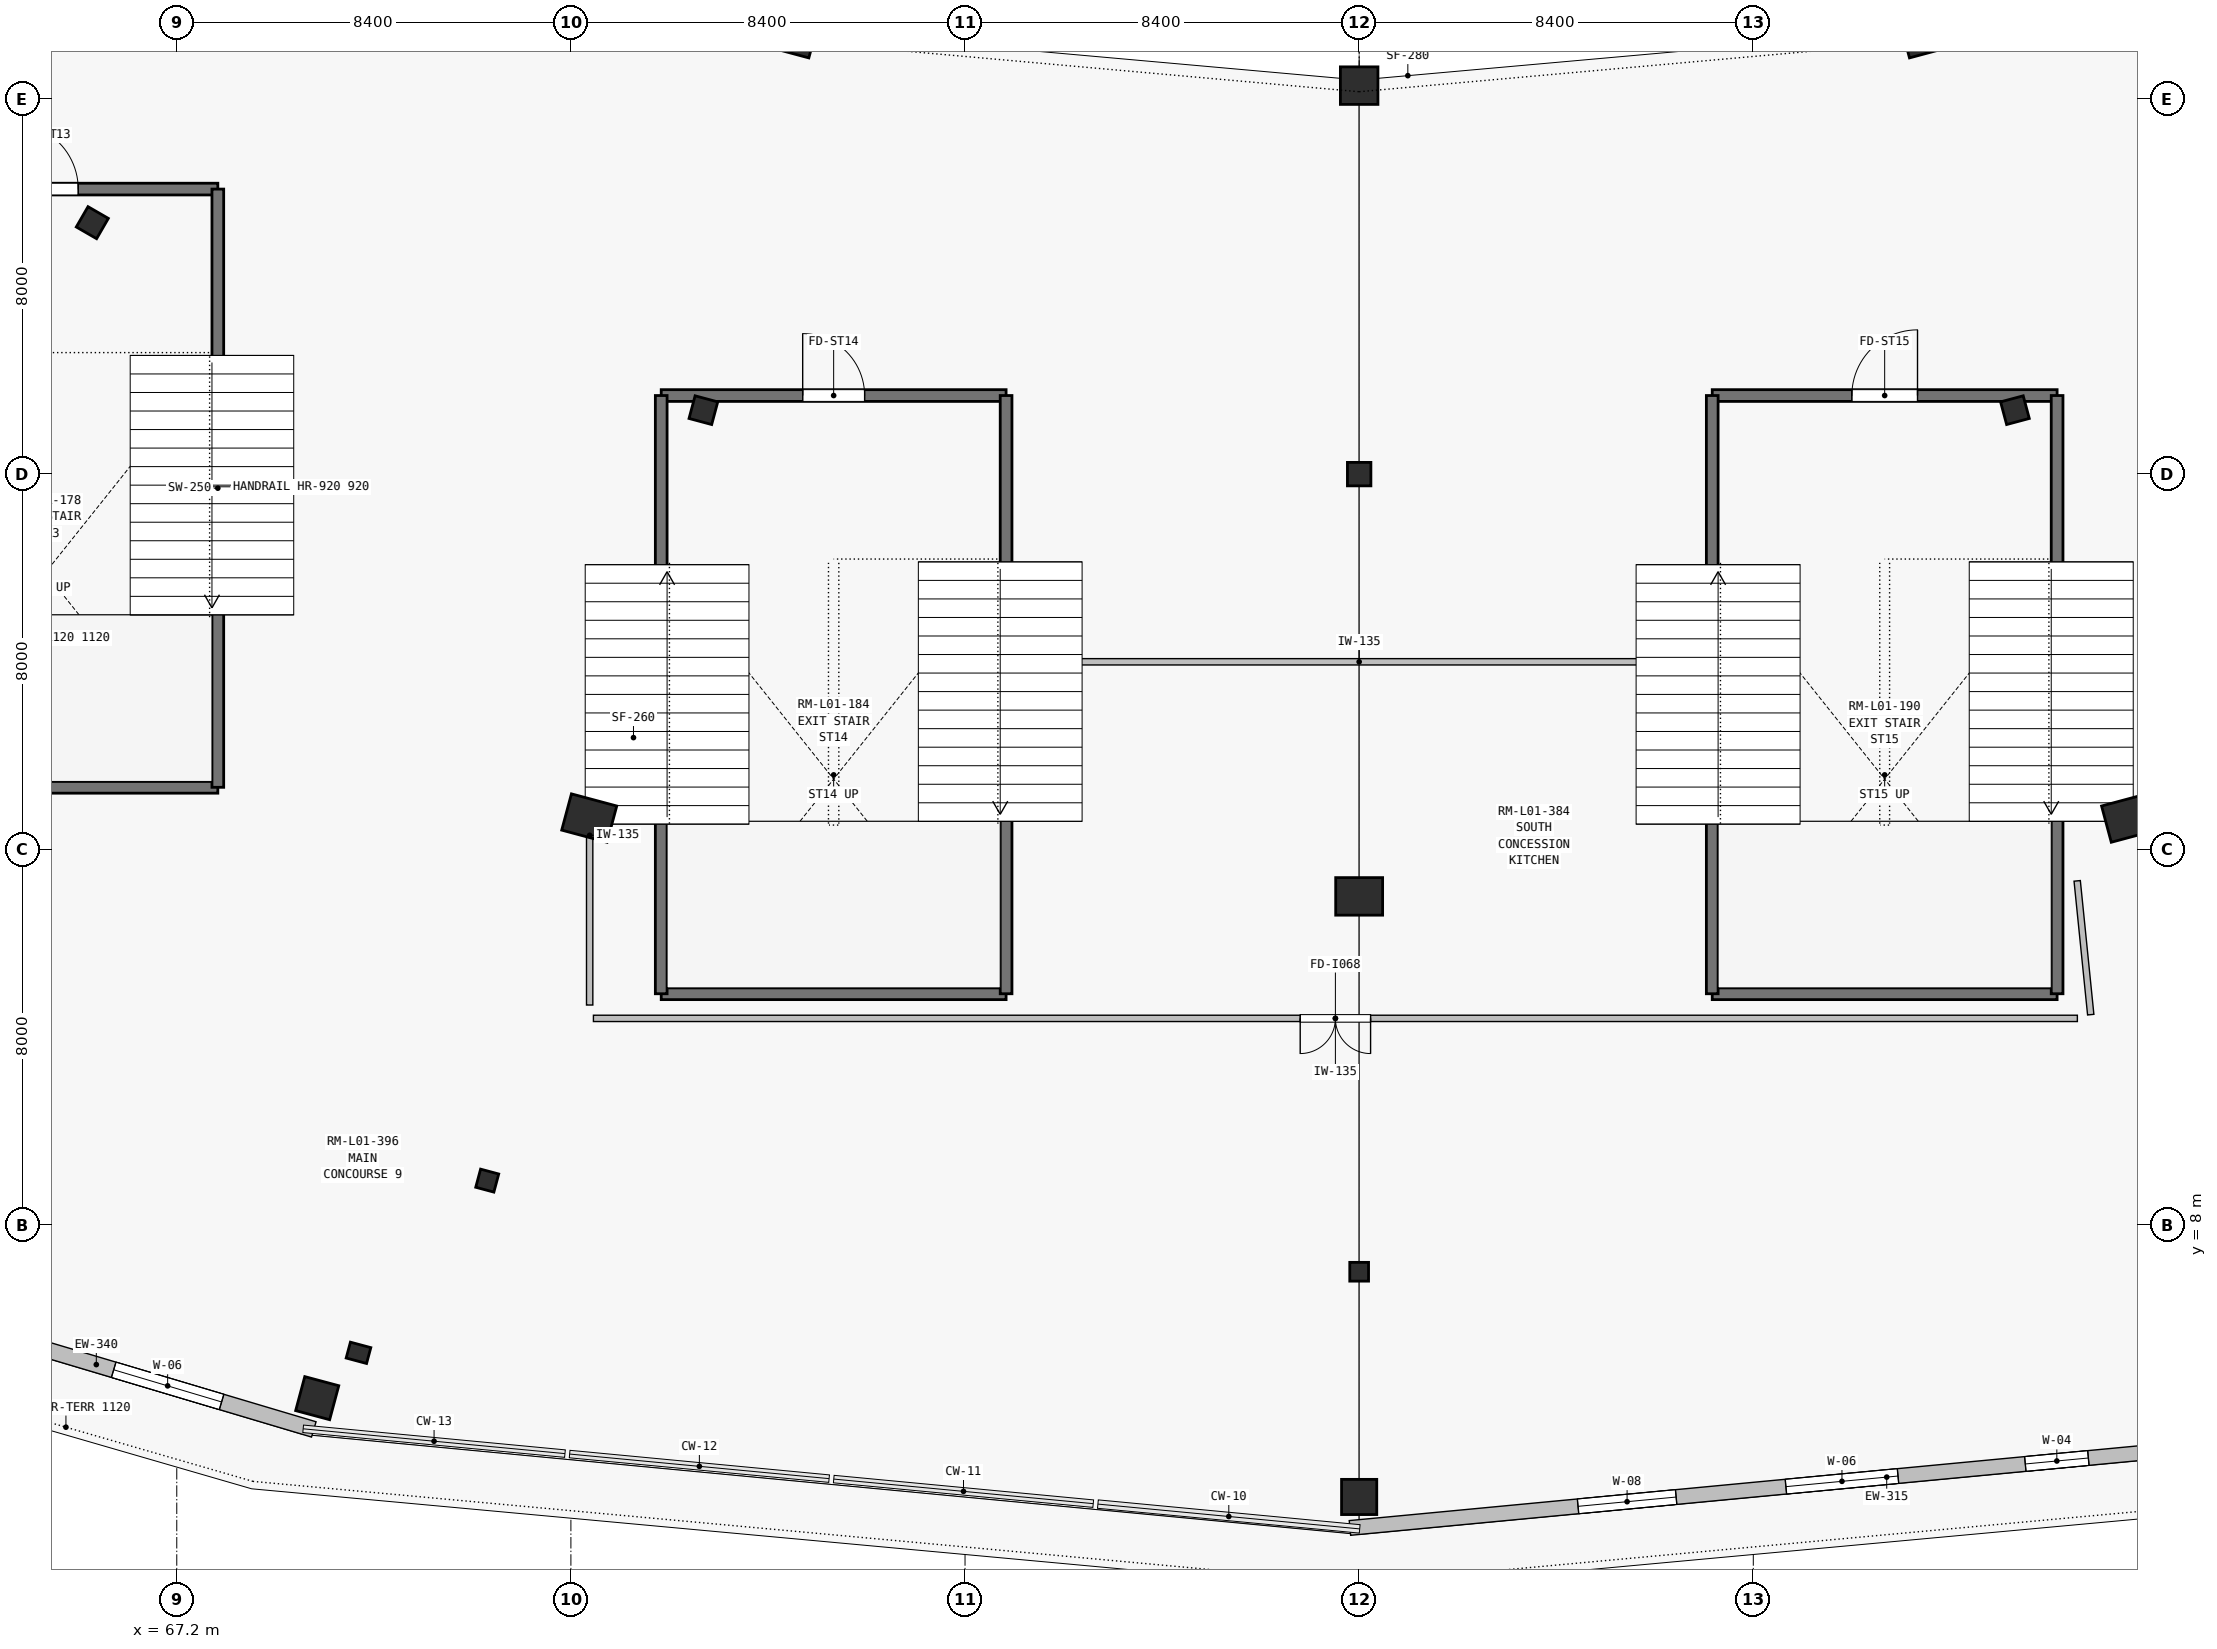
"""IFC4 building model, lengths in metres.
Left out: names, types, materials, properties, quantities, classifications, styles, units other than length and angle.
Written with IfcOpenShell. Run it as: python <this file> out.ifc"""

import sys

from ifc_helpers import new_model, si_unit, direction, frame, frame_2d, origin, origin_2d, place, context, subcontext, project, spatial, rectangle, i_section, extrude, element, fill, save


model = new_model("IFC4")
c1 = context("Model", 3, precision=1e-05, world=origin(), true_north=direction((0.0, 1.0)))
c2 = subcontext(c1, "Body", "Model", "MODEL_VIEW")
j1 = project(units=[si_unit("LENGTHUNIT", "METRE"), si_unit("PLANEANGLEUNIT", "RADIAN")], contexts=[c1])
p1 = place(None, origin())
s1 = spatial("IfcSite", under=j1, at=p1, CompositionType="ELEMENT")
p2 = place(p1, origin())
s2 = spatial("IfcBuilding", under=s1, at=p2, CompositionType="ELEMENT")
p3 = place(p2, frame((0.0, 0.0, 5.4)))
s3 = spatial("IfcBuildingStorey", under=s2, at=p3, CompositionType="ELEMENT", Elevation=5.4)
for number, where, z_axis, x_axis in (
    (1, (65.4, 29.359, 0.0), (0.0, 0.0, 1.0), (-0.5, -0.866, 0.0)),
    (2, (78.424, 25.363, 0.0), (0.0, 0.0, 1.0), (-0.259, -0.966, 0.0)),
    (3, (92.4, 24.0, 0.0), (0.0, 0.0, 1.0), (0.0, -1.0, 0.0)),
    (4, (106.376, 25.363, 0.0), (0.0, 0.0, 1.0), (0.259, -0.966, 0.0)),
):
    element("IfcColumn", number, at=place(p3, frame(where, z_axis=z_axis, x_axis=x_axis)), inside=s3, PredefinedType="COLUMN", context=c2, shape_type="SweptSolid", body=[
        extrude(i_section(OverallWidth=0.5, OverallDepth=0.5, WebThickness=0.02, FlangeThickness=0.035, at=origin_2d()), origin(), (0.0, 0.0, 1.0), 4.5),
    ])
for number, where, z_axis, x_axis in (
    (5, (80.388, 33.361, 0.0), (0.0, 0.0, 1.0), (-0.259, -0.966, 0.0)),
    (6, (92.4, 32.28, 0.0), (0.0, 0.0, 1.0), (0.0, -1.0, 0.0)),
    (7, (104.412, 33.361, 0.0), (0.0, 0.0, 1.0), (0.259, -0.966, 0.0)),
):
    element("IfcColumn", number, at=place(p3, frame(where, z_axis=z_axis, x_axis=x_axis)), inside=s3, PredefinedType="COLUMN", context=c2, shape_type="SweptSolid", body=[
        extrude(rectangle(XDim=0.8, YDim=0.8, at=origin_2d()), origin(), (0.0, 0.0, 1.0), 4.5),
    ])
for number, where, z_axis, x_axis in (
    (8, (75.991, 16.67, 0.0), (0.0, 0.0, 1.0), (-0.259, -0.966, 0.0)),
    (9, (92.4, 15.0, 0.0), (0.0, 0.0, 1.0), (0.0, -1.0, 0.0)),
    (10, (108.809, 16.67, 0.0), (0.0, 0.0, 1.0), (0.259, -0.966, 0.0)),
):
    element("IfcColumn", number, at=place(p3, frame(where, z_axis=z_axis, x_axis=x_axis)), inside=s3, PredefinedType="COLUMN", context=c2, shape_type="SweptSolid", body=[
        extrude(rectangle(XDim=0.8, YDim=1.0, at=origin_2d()), origin(), (0.0, 0.0, 1.0), 4.5),
    ])
for number, where, z_axis, x_axis in (
    (11, (73.817, 8.942, 0.0), (0.0, 0.0, 1.0), (-0.259, -0.966, 0.0)),
    (12, (92.4, 7.0, 0.0), (0.0, 0.0, 1.0), (0.0, -1.0, 0.0)),
):
    element("IfcColumn", number, at=place(p3, frame(where, z_axis=z_axis, x_axis=x_axis)), inside=s3, PredefinedType="COLUMN", context=c2, shape_type="SweptSolid", body=[
        extrude(i_section(OverallWidth=0.4, OverallDepth=0.4, WebThickness=0.018, FlangeThickness=0.032, at=origin_2d()), origin(), (0.0, 0.0, 1.0), 4.5),
    ])
for number, where, z_axis, x_axis in (
    (13, (70.193, 4.306, 0.0), (0.0, 0.0, 1.0), (-0.259, -0.966, 0.0)),
    (14, (92.4, 2.2, 0.0), (0.0, 0.0, 1.0), (0.0, -1.0, 0.0)),
):
    element("IfcColumn", number, at=place(p3, frame(where, z_axis=z_axis, x_axis=x_axis)), inside=s3, PredefinedType="COLUMN", context=c2, shape_type="SweptSolid", body=[
        extrude(rectangle(XDim=0.75, YDim=0.75, at=origin_2d()), origin(), (0.0, 0.0, 1.0), 4.25),
    ])
p4 = place(p3, frame((71.073, 5.272, 0.0), z_axis=(0.0, 0.0, 1.0), x_axis=(-0.258819045103, -0.965925826289, 0.0)))
e15 = element("IfcColumn", 15, at=p4, inside=s3, PredefinedType="PILASTER", context=c2, shape_type="SweptSolid", body=[
    extrude(rectangle(XDim=0.35, YDim=0.45, at=origin_2d()), origin(), (0.0, 0.0, 1.0), 4.5),
])
p5 = place(p3, frame((115.084, 3.707, 0.0), z_axis=(0.0, 0.0, 1.0), x_axis=(-0.995543183051, -0.094306790217, 0.0)))
e16 = element("IfcWall", 16, at=p5, inside=s3, PredefinedType="SOLIDWALL", context=c2, shape_type="SweptSolid", body=[
    extrude(rectangle(XDim=22.983, YDim=0.315, at=frame_2d((11.492, 0.0))), origin(), (0.0, 0.0, 1.0), 4.25),
])
p6 = place(p5, frame((1.683, 0.0, 0.0)))
e17 = element("IfcOpeningElement", 17, at=p6, cuts=e16, PredefinedType="OPENING", context=c2, shape_type="SweptSolid", body=[
    extrude(rectangle(XDim=1.95, YDim=2.35, at=frame_2d((0.975, 1.175))), frame((0.0, 0.167, 0.0), z_axis=(0.0, -1.0, 0.0), x_axis=(1.0, 0.0, 0.0)), (0.0, 0.0, 1.0), 0.335),
])
p7 = place(p5, frame((7.175, 0.0, 0.75)))
e18 = element("IfcOpeningElement", 18, at=p7, cuts=e16, PredefinedType="OPENING", context=c2, shape_type="SweptSolid", body=[
    extrude(rectangle(XDim=1.35, YDim=2.3, at=frame_2d((0.675, 1.15))), frame((0.0, 0.167, 0.0), z_axis=(0.0, -1.0, 0.0), x_axis=(1.0, 0.0, 0.0)), (0.0, 0.0, 1.0), 0.335),
])
p8 = place(p5, frame((11.25, 0.0, 0.9)))
e19 = element("IfcOpeningElement", 19, at=p8, cuts=e16, PredefinedType="OPENING", context=c2, shape_type="SweptSolid", body=[
    extrude(rectangle(XDim=2.4, YDim=2.1, at=frame_2d((1.2, 1.05))), frame((0.0, 0.167, 0.0), z_axis=(0.0, -1.0, 0.0), x_axis=(1.0, 0.0, 0.0)), (0.0, 0.0, 1.0), 0.335),
])
p9 = place(p5, frame((16.0, 0.0, 0.9)))
e20 = element("IfcOpeningElement", 20, at=p9, cuts=e16, PredefinedType="OPENING", context=c2, shape_type="SweptSolid", body=[
    extrude(rectangle(XDim=2.1, YDim=2.0, at=frame_2d((1.05, 1.0))), frame((0.0, 0.167, 0.0), z_axis=(0.0, -1.0, 0.0), x_axis=(1.0, 0.0, 0.0)), (0.0, 0.0, 1.0), 0.335),
])
p10 = place(p3, frame((70.12, 3.64, 0.0), z_axis=(0.0, 0.0, 1.0), x_axis=(-0.958339954226, 0.285630061678, 0.0)))
e21 = element("IfcWall", 21, at=p10, inside=s3, PredefinedType="SOLIDWALL", context=c2, shape_type="SweptSolid", body=[
    extrude(rectangle(XDim=22.289, YDim=0.34, at=frame_2d((11.145, 0.0))), origin(), (0.0, 0.0, 1.0), 4.25),
])
p11 = place(p10, frame((2.05, 0.0, 0.9)))
e22 = element("IfcOpeningElement", 22, at=p11, cuts=e21, PredefinedType="OPENING", context=c2, shape_type="SweptSolid", body=[
    extrude(rectangle(XDim=2.4, YDim=2.1, at=frame_2d((1.2, 1.05))), frame((0.0, 0.18, 0.0), z_axis=(0.0, -1.0, 0.0), x_axis=(1.0, 0.0, 0.0)), (0.0, 0.0, 1.0), 0.36),
])
p12 = place(p10, frame((6.8, 0.0, 0.9)))
e23 = element("IfcOpeningElement", 23, at=p12, cuts=e21, PredefinedType="OPENING", context=c2, shape_type="SweptSolid", body=[
    extrude(rectangle(XDim=2.1, YDim=2.0, at=frame_2d((1.05, 1.0))), frame((0.0, 0.18, 0.0), z_axis=(0.0, -1.0, 0.0), x_axis=(1.0, 0.0, 0.0)), (0.0, 0.0, 1.0), 0.36),
])
p13 = place(p10, frame((10.95, 0.0, 0.9)))
e24 = element("IfcOpeningElement", 24, at=p13, cuts=e21, PredefinedType="OPENING", context=c2, shape_type="SweptSolid", body=[
    extrude(rectangle(XDim=3.0, YDim=1.6, at=frame_2d((1.5, 0.8))), frame((0.0, 0.18, 0.0), z_axis=(0.0, -1.0, 0.0), x_axis=(1.0, 0.0, 0.0)), (0.0, 0.0, 1.0), 0.36),
])
p14 = place(p10, frame((15.7, 0.0, 0.9)))
e25 = element("IfcOpeningElement", 25, at=p14, cuts=e21, PredefinedType="OPENING", context=c2, shape_type="SweptSolid", body=[
    extrude(rectangle(XDim=2.7, YDim=1.55, at=frame_2d((1.35, 0.775))), frame((0.0, 0.18, 0.0), z_axis=(0.0, -1.0, 0.0), x_axis=(1.0, 0.0, 0.0)), (0.0, 0.0, 1.0), 0.36),
])
p15 = place(p3, frame((60.725, 17.325, 0.0), z_axis=(0.0, 0.0, 1.0), x_axis=(1.0, 0.0, 0.0)))
e26 = element("IfcWall", 26, at=p15, inside=s3, PredefinedType="SHEAR", context=c2, shape_type="SweptSolid", body=[
    extrude(rectangle(XDim=7.35, YDim=0.25, at=frame_2d((3.675, 0.0))), origin(), (0.0, 0.0, 1.0), 4.5),
])
p16 = place(p3, frame((60.725, 30.075, 0.0), z_axis=(0.0, 0.0, 1.0), x_axis=(1.0, 0.0, 0.0)))
e27 = element("IfcWall", 27, at=p16, inside=s3, PredefinedType="SHEAR", context=c2, shape_type="SweptSolid", body=[
    extrude(rectangle(XDim=7.35, YDim=0.25, at=frame_2d((3.675, 0.0))), origin(), (0.0, 0.0, 1.0), 4.5),
])
p17 = place(p16, frame((2.975, 0.0, 0.0)))
e28 = element("IfcOpeningElement", 28, at=p17, cuts=e27, PredefinedType="OPENING", context=c2, shape_type="SweptSolid", body=[
    extrude(rectangle(XDim=1.4, YDim=2.2, at=frame_2d((0.7, 1.1))), frame((0.0, 0.135, 0.0), z_axis=(0.0, -1.0, 0.0), x_axis=(1.0, 0.0, 0.0)), (0.0, 0.0, 1.0), 0.27),
])
p18 = place(p3, frame((68.075, 17.325, 0.0), z_axis=(0.0, 0.0, 1.0), x_axis=(0.0, 1.0, 0.0)))
e29 = element("IfcWall", 29, at=p18, inside=s3, PredefinedType="SHEAR", context=c2, shape_type="SweptSolid", body=[
    extrude(rectangle(XDim=12.75, YDim=0.25, at=frame_2d((6.375, 0.0))), origin(), (0.0, 0.0, 1.0), 4.5),
])
p19 = place(p3, frame((77.525, 12.925, 0.0), z_axis=(0.0, 0.0, 1.0), x_axis=(1.0, 0.0, 0.0)))
e30 = element("IfcWall", 30, at=p19, inside=s3, PredefinedType="SHEAR", context=c2, shape_type="SweptSolid", body=[
    extrude(rectangle(XDim=7.35, YDim=0.25, at=frame_2d((3.675, 0.0))), origin(), (0.0, 0.0, 1.0), 4.5),
])
p20 = place(p3, frame((77.525, 25.675, 0.0), z_axis=(0.0, 0.0, 1.0), x_axis=(1.0, 0.0, 0.0)))
e31 = element("IfcWall", 31, at=p20, inside=s3, PredefinedType="SHEAR", context=c2, shape_type="SweptSolid", body=[
    extrude(rectangle(XDim=7.35, YDim=0.25, at=frame_2d((3.675, 0.0))), origin(), (0.0, 0.0, 1.0), 4.5),
])
p21 = place(p20, frame((3.015, 0.0, 0.0)))
e32 = element("IfcOpeningElement", 32, at=p21, cuts=e31, PredefinedType="OPENING", context=c2, shape_type="SweptSolid", body=[
    extrude(rectangle(XDim=1.32, YDim=2.2, at=frame_2d((0.66, 1.1))), frame((0.0, 0.135, 0.0), z_axis=(0.0, -1.0, 0.0), x_axis=(1.0, 0.0, 0.0)), (0.0, 0.0, 1.0), 0.27),
])
for number, where, z_axis, x_axis in (
    (33, (77.525, 12.925, 0.0), (0.0, 0.0, 1.0), (0.0, 1.0, 0.0)),
    (34, (84.875, 12.925, 0.0), (0.0, 0.0, 1.0), (0.0, 1.0, 0.0)),
):
    element("IfcWall", number, at=place(p3, frame(where, z_axis=z_axis, x_axis=x_axis)), inside=s3, PredefinedType="SHEAR", context=c2, shape_type="SweptSolid", body=[
        extrude(rectangle(XDim=12.75, YDim=0.25, at=frame_2d((6.375, 0.0))), origin(), (0.0, 0.0, 1.0), 4.5),
    ])
p22 = place(p3, frame((99.925, 12.925, 0.0), z_axis=(0.0, 0.0, 1.0), x_axis=(1.0, 0.0, 0.0)))
e35 = element("IfcWall", 35, at=p22, inside=s3, PredefinedType="SHEAR", context=c2, shape_type="SweptSolid", body=[
    extrude(rectangle(XDim=7.35, YDim=0.25, at=frame_2d((3.675, 0.0))), origin(), (0.0, 0.0, 1.0), 4.5),
])
p23 = place(p3, frame((99.925, 25.675, 0.0), z_axis=(0.0, 0.0, 1.0), x_axis=(1.0, 0.0, 0.0)))
e36 = element("IfcWall", 36, at=p23, inside=s3, PredefinedType="SHEAR", context=c2, shape_type="SweptSolid", body=[
    extrude(rectangle(XDim=7.35, YDim=0.25, at=frame_2d((3.675, 0.0))), origin(), (0.0, 0.0, 1.0), 4.5),
])
p24 = place(p23, frame((2.975, 0.0, 0.0)))
e37 = element("IfcOpeningElement", 37, at=p24, cuts=e36, PredefinedType="OPENING", context=c2, shape_type="SweptSolid", body=[
    extrude(rectangle(XDim=1.4, YDim=2.2, at=frame_2d((0.7, 1.1))), frame((0.0, 0.135, 0.0), z_axis=(0.0, -1.0, 0.0), x_axis=(1.0, 0.0, 0.0)), (0.0, 0.0, 1.0), 0.27),
])
for number, where, z_axis, x_axis in (
    (38, (99.925, 12.925, 0.0), (0.0, 0.0, 1.0), (0.0, 1.0, 0.0)),
    (39, (107.275, 12.925, 0.0), (0.0, 0.0, 1.0), (0.0, 1.0, 0.0)),
):
    element("IfcWall", number, at=place(p3, frame(where, z_axis=z_axis, x_axis=x_axis)), inside=s3, PredefinedType="SHEAR", context=c2, shape_type="SweptSolid", body=[
        extrude(rectangle(XDim=12.75, YDim=0.25, at=frame_2d((6.375, 0.0))), origin(), (0.0, 0.0, 1.0), 4.5),
    ])
p25 = place(p3, frame((85.375, 20.0, 0.0), z_axis=(0.0, 0.0, 1.0), x_axis=(1.0, 0.0, 0.0)))
e40 = element("IfcWall", 40, at=p25, inside=s3, PredefinedType="PARTITIONING", context=c2, shape_type="SweptSolid", body=[
    extrude(rectangle(XDim=14.05, YDim=0.135, at=frame_2d((7.025, 0.0))), origin(), (0.0, 0.0, 1.0), 3.642),
])
p26 = place(p3, frame((107.703, 15.331, 0.0), z_axis=(0.0, 0.0, 1.0), x_axis=(0.10077723819, -0.994909015068, 0.0)))
e41 = element("IfcWall", 41, at=p26, inside=s3, PredefinedType="PARTITIONING", context=c2, shape_type="SweptSolid", body=[
    extrude(rectangle(XDim=2.866, YDim=0.135, at=frame_2d((1.433, 0.0))), origin(), (0.0, 0.0, 1.0), 3.823),
])
p27 = place(p3, frame((107.707, 12.4, 0.0), z_axis=(0.0, 0.0, 1.0), x_axis=(-1.0, 0.0, 0.0)))
e42 = element("IfcWall", 42, at=p27, inside=s3, PredefinedType="PARTITIONING", context=c2, shape_type="SweptSolid", body=[
    extrude(rectangle(XDim=31.627, YDim=0.135, at=frame_2d((15.813, 0.0))), origin(), (0.0, 0.0, 1.0), 3.642),
])
p28 = place(p27, frame((15.063, 0.0, 0.0)))
e43 = element("IfcOpeningElement", 43, at=p28, cuts=e42, PredefinedType="OPENING", context=c2, shape_type="SweptSolid", body=[
    extrude(rectangle(XDim=1.5, YDim=2.2, at=frame_2d((0.75, 1.1))), frame((0.0, 0.077, 0.0), z_axis=(0.0, -1.0, 0.0), x_axis=(1.0, 0.0, 0.0)), (0.0, 0.0, 1.0), 0.155),
])
p29 = place(p3, frame((76.0, 12.685, 0.0), z_axis=(0.0, 0.0, 1.0), x_axis=(0.0, 1.0, 0.0)))
e44 = element("IfcWall", 44, at=p29, inside=s3, PredefinedType="PARTITIONING", context=c2, shape_type="SweptSolid", body=[
    extrude(rectangle(XDim=7.235, YDim=0.135, at=frame_2d((3.618, 0.0))), origin(), (0.0, 0.0, 1.0), 3.682),
])
p30 = place(p7, origin())
e45 = element("IfcWindow", 45, at=p30, inside=s3, PartitioningType="SINGLE_PANEL", PredefinedType="WINDOW", context=c2, shape_type="SweptSolid", body=[
    extrude(rectangle(XDim=1.35, YDim=2.3, at=frame_2d((0.675, 1.15))), frame((0.0, 0.03, 0.0), z_axis=(0.0, -1.0, 0.0), x_axis=(1.0, 0.0, 0.0)), (0.0, 0.0, 1.0), 0.06),
])
fill(e18, e45)
p31 = place(p8, origin())
e46 = element("IfcWindow", 46, at=p31, inside=s3, PartitioningType="SINGLE_PANEL", PredefinedType="WINDOW", context=c2, shape_type="SweptSolid", body=[
    extrude(rectangle(XDim=2.4, YDim=2.1, at=frame_2d((1.2, 1.05))), frame((0.0, 0.03, 0.0), z_axis=(0.0, -1.0, 0.0), x_axis=(1.0, 0.0, 0.0)), (0.0, 0.0, 1.0), 0.06),
])
fill(e19, e46)
p32 = place(p9, origin())
e47 = element("IfcWindow", 47, at=p32, inside=s3, PartitioningType="SINGLE_PANEL", PredefinedType="WINDOW", context=c2, shape_type="SweptSolid", body=[
    extrude(rectangle(XDim=2.1, YDim=2.0, at=frame_2d((1.05, 1.0))), frame((0.0, 0.03, 0.0), z_axis=(0.0, -1.0, 0.0), x_axis=(1.0, 0.0, 0.0)), (0.0, 0.0, 1.0), 0.06),
])
fill(e20, e47)
p33 = place(p11, origin())
e48 = element("IfcWindow", 48, at=p33, inside=s3, PartitioningType="SINGLE_PANEL", PredefinedType="WINDOW", context=c2, shape_type="SweptSolid", body=[
    extrude(rectangle(XDim=2.4, YDim=2.1, at=frame_2d((1.2, 1.05))), frame((0.0, 0.03, 0.0), z_axis=(0.0, -1.0, 0.0), x_axis=(1.0, 0.0, 0.0)), (0.0, 0.0, 1.0), 0.06),
])
fill(e22, e48)
p34 = place(p17, origin())
e49 = element("IfcDoor", 49, at=p34, inside=s3, OperationType="SINGLE_SWING_LEFT", PredefinedType="DOOR", context=c2, shape_type="SweptSolid", body=[
    extrude(rectangle(XDim=1.4, YDim=2.2, at=frame_2d((0.7, 1.1))), frame((0.0, 0.025, 0.0), z_axis=(0.0, -1.0, 0.0), x_axis=(1.0, 0.0, 0.0)), (0.0, 0.0, 1.0), 0.05),
])
fill(e28, e49)
p35 = place(p21, origin())
e50 = element("IfcDoor", 50, at=p35, inside=s3, OperationType="SINGLE_SWING_LEFT", PredefinedType="DOOR", context=c2, shape_type="SweptSolid", body=[
    extrude(rectangle(XDim=1.32, YDim=2.2, at=frame_2d((0.66, 1.1))), frame((0.0, 0.025, 0.0), z_axis=(0.0, -1.0, 0.0), x_axis=(1.0, 0.0, 0.0)), (0.0, 0.0, 1.0), 0.05),
])
fill(e32, e50)
p36 = place(p24, origin())
e51 = element("IfcDoor", 51, at=p36, inside=s3, OperationType="SINGLE_SWING_RIGHT", PredefinedType="DOOR", context=c2, shape_type="SweptSolid", body=[
    extrude(rectangle(XDim=1.4, YDim=2.2, at=frame_2d((0.7, 1.1))), frame((0.0, 0.025, 0.0), z_axis=(0.0, -1.0, 0.0), x_axis=(1.0, 0.0, 0.0)), (0.0, 0.0, 1.0), 0.05),
])
fill(e37, e51)
p37 = place(p28, origin())
e52 = element("IfcDoor", 52, at=p37, inside=s3, OperationType="DOUBLE_DOOR_SINGLE_SWING", PredefinedType="DOOR", context=c2, shape_type="SweptSolid", body=[
    extrude(rectangle(XDim=1.5, YDim=2.2, at=frame_2d((0.75, 1.1))), frame((0.0, 0.025, 0.0), z_axis=(0.0, -1.0, 0.0), x_axis=(1.0, 0.0, 0.0)), (0.0, 0.0, 1.0), 0.05),
])
fill(e43, e52)
save(model, sys.argv[1])
